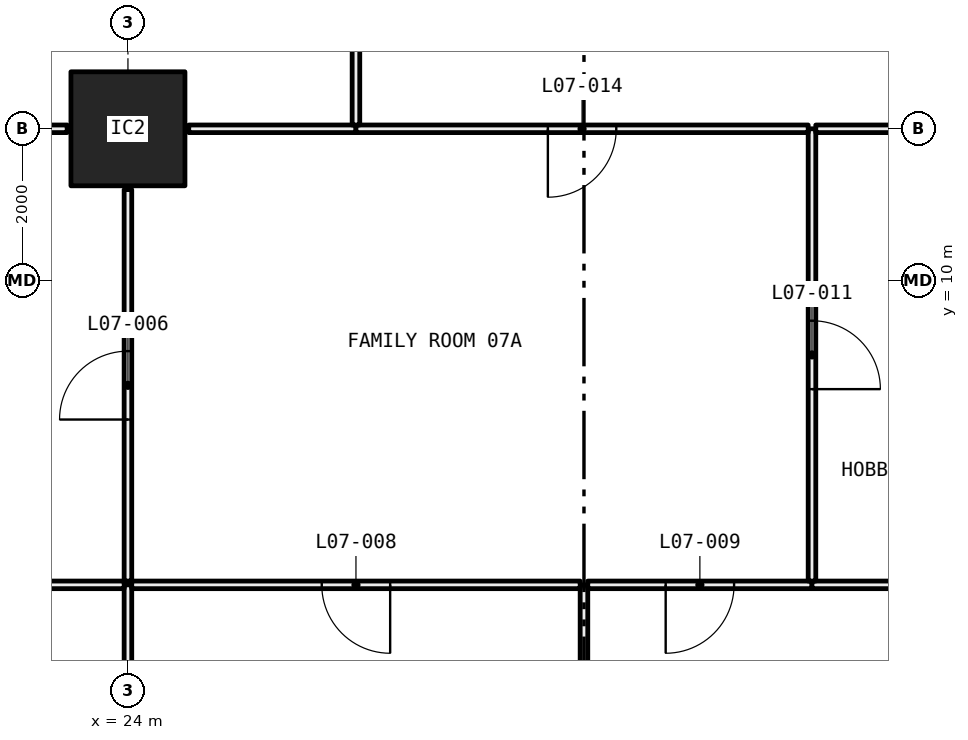
"""IFC4 building model, lengths in metres.
Left out: names, types, materials, properties, quantities, classifications, styles, units other than length and angle.
Written with IfcOpenShell. Run it as: python <this file> out.ifc"""

import sys

from ifc_helpers import new_model, si_unit, direction, frame, frame_2d, origin, origin_2d, place, context, subcontext, project, spatial, rectangle, hollow_rectangle, extrude, element, fill, save


model = new_model("IFC4")
c1 = context("Model", 3, precision=1e-05, world=origin(), true_north=direction((0.0, 1.0)))
c2 = subcontext(c1, "Body", "Model", "MODEL_VIEW")
j1 = project(units=[si_unit("LENGTHUNIT", "METRE"), si_unit("PLANEANGLEUNIT", "RADIAN")], contexts=[c1])
p1 = place(None, origin())
s1 = spatial("IfcSite", under=j1, at=p1, CompositionType="ELEMENT")
p2 = place(p1, origin())
s2 = spatial("IfcBuilding", under=s1, at=p2, CompositionType="ELEMENT")
p3 = place(p2, frame((0.0, 0.0, 36.9)))
s3 = spatial("IfcBuildingStorey", under=s2, at=p3, CompositionType="ELEMENT", Elevation=36.9)
p4 = place(p3, frame((24.0, 12.0, 0.0), z_axis=(0.0, 0.0, 1.0), x_axis=(1.0, 0.0, 0.0)))
e1 = element("IfcColumn", 1, at=p4, inside=s3, PredefinedType="COLUMN", context=c2, shape_type="SweptSolid", body=[
    extrude(hollow_rectangle(XDim=1.5, YDim=1.5, WallThickness=0.065, at=origin_2d()), origin(), (0.0, 0.0, 1.0), 3.05),
])
p5 = place(p3, frame((24.0, 0.72, 0.0), z_axis=(0.0, 0.0, 1.0), x_axis=(0.0, 1.0, 0.0)))
e2 = element("IfcWall", 2, at=p5, inside=s3, PredefinedType="PARTITIONING", context=c2, shape_type="SweptSolid", body=[
    extrude(rectangle(XDim=5.28, YDim=0.1, at=frame_2d((2.64, 0.0))), origin(), (0.0, 0.0, 1.0), 2.45),
])
p6 = place(p3, frame((23.95, 6.0, 0.0), z_axis=(0.0, 0.0, 1.0), x_axis=(-1.0, 0.0, 0.0)))
e3 = element("IfcWall", 3, at=p6, inside=s3, PredefinedType="PARTITIONING", context=c2, shape_type="SweptSolid", body=[
    extrude(rectangle(XDim=5.9, YDim=0.1, at=frame_2d((2.95, 0.0))), origin(), (0.0, 0.0, 1.0), 2.45),
])
p7 = place(p6, frame((2.5, 0.0, 0.0)))
e4 = element("IfcOpeningElement", 4, at=p7, cuts=e3, PredefinedType="OPENING", context=c2, shape_type="SweptSolid", body=[
    extrude(rectangle(XDim=0.9, YDim=2.1, at=frame_2d((0.45, 1.05))), frame((0.0, 0.06, 0.0), z_axis=(0.0, -1.0, 0.0), x_axis=(1.0, 0.0, 0.0)), (0.0, 0.0, 1.0), 0.12),
])
p8 = place(p3, frame((30.0, 0.72, 0.0), z_axis=(0.0, 0.0, 1.0), x_axis=(0.0, 1.0, 0.0)))
e5 = element("IfcWall", 5, at=p8, inside=s3, PredefinedType="PARTITIONING", context=c2, shape_type="SweptSolid", body=[
    extrude(rectangle(XDim=5.28, YDim=0.1, at=frame_2d((2.64, 0.0))), origin(), (0.0, 0.0, 1.0), 3.05),
])
p9 = place(p3, frame((29.95, 6.0, 0.0), z_axis=(0.0, 0.0, 1.0), x_axis=(-1.0, 0.0, 0.0)))
e6 = element("IfcWall", 6, at=p9, inside=s3, PredefinedType="PARTITIONING", context=c2, shape_type="SweptSolid", body=[
    extrude(rectangle(XDim=5.9, YDim=0.1, at=frame_2d((2.95, 0.0))), origin(), (0.0, 0.0, 1.0), 2.45),
])
p10 = place(p9, frame((2.5, 0.0, 0.0)))
e7 = element("IfcOpeningElement", 7, at=p10, cuts=e6, PredefinedType="OPENING", context=c2, shape_type="SweptSolid", body=[
    extrude(rectangle(XDim=0.9, YDim=2.1, at=frame_2d((0.45, 1.05))), frame((0.0, 0.06, 0.0), z_axis=(0.0, -1.0, 0.0), x_axis=(1.0, 0.0, 0.0)), (0.0, 0.0, 1.0), 0.12),
])
p11 = place(p3, frame((33.0, 6.0, 0.0), z_axis=(0.0, 0.0, 1.0), x_axis=(-1.0, 0.0, 0.0)))
e8 = element("IfcWall", 8, at=p11, inside=s3, PredefinedType="PARTITIONING", context=c2, shape_type="SweptSolid", body=[
    extrude(rectangle(XDim=2.95, YDim=0.1, at=frame_2d((1.475, 0.0))), origin(), (0.0, 0.0, 1.0), 3.05),
])
p12 = place(p11, frame((1.025, 0.0, 0.0)))
e9 = element("IfcOpeningElement", 9, at=p12, cuts=e8, PredefinedType="OPENING", context=c2, shape_type="SweptSolid", body=[
    extrude(rectangle(XDim=0.9, YDim=2.1, at=frame_2d((0.45, 1.05))), frame((0.0, 0.06, 0.0), z_axis=(0.0, -1.0, 0.0), x_axis=(1.0, 0.0, 0.0)), (0.0, 0.0, 1.0), 0.12),
])
p13 = place(p3, frame((35.9, 6.0, 0.0), z_axis=(0.0, 0.0, 1.0), x_axis=(-1.0, 0.0, 0.0)))
e10 = element("IfcWall", 10, at=p13, inside=s3, PredefinedType="PARTITIONING", context=c2, shape_type="SweptSolid", body=[
    extrude(rectangle(XDim=2.9, YDim=0.1, at=frame_2d((1.45, 0.0))), origin(), (0.0, 0.0, 1.0), 3.05),
])
p14 = place(p3, frame((24.0, 6.05, 0.0), z_axis=(0.0, 0.0, 1.0), x_axis=(0.0, 1.0, 0.0)))
e11 = element("IfcWall", 11, at=p14, inside=s3, PredefinedType="PARTITIONING", context=c2, shape_type="SweptSolid", body=[
    extrude(rectangle(XDim=5.15, YDim=0.1, at=frame_2d((2.575, 0.0))), origin(), (0.0, 0.0, 1.0), 2.45),
])
p15 = place(p14, frame((2.125, 0.0, 0.0)))
e12 = element("IfcOpeningElement", 12, at=p15, cuts=e11, PredefinedType="OPENING", context=c2, shape_type="SweptSolid", body=[
    extrude(rectangle(XDim=0.9, YDim=2.1, at=frame_2d((0.45, 1.05))), frame((0.0, 0.06, 0.0), z_axis=(0.0, -1.0, 0.0), x_axis=(1.0, 0.0, 0.0)), (0.0, 0.0, 1.0), 0.12),
])
p16 = place(p3, frame((23.2, 12.0, 0.0), z_axis=(0.0, 0.0, 1.0), x_axis=(-1.0, 0.0, 0.0)))
e13 = element("IfcWall", 13, at=p16, inside=s3, PredefinedType="PARTITIONING", context=c2, shape_type="SweptSolid", body=[
    extrude(rectangle(XDim=5.2, YDim=0.1, at=frame_2d((2.6, 0.0))), origin(), (0.0, 0.0, 1.0), 2.45),
])
p17 = place(p3, frame((33.0, 6.05, 0.0), z_axis=(0.0, 0.0, 1.0), x_axis=(0.0, 1.0, 0.0)))
e14 = element("IfcWall", 14, at=p17, inside=s3, PredefinedType="PARTITIONING", context=c2, shape_type="SweptSolid", body=[
    extrude(rectangle(XDim=5.95, YDim=0.1, at=frame_2d((2.975, 0.0))), origin(), (0.0, 0.0, 1.0), 2.45),
])
p18 = place(p17, frame((2.525, 0.0, 0.0)))
e15 = element("IfcOpeningElement", 15, at=p18, cuts=e14, PredefinedType="OPENING", context=c2, shape_type="SweptSolid", body=[
    extrude(rectangle(XDim=0.9, YDim=2.1, at=frame_2d((0.45, 1.05))), frame((0.0, 0.06, 0.0), z_axis=(0.0, -1.0, 0.0), x_axis=(1.0, 0.0, 0.0)), (0.0, 0.0, 1.0), 0.12),
])
p19 = place(p3, frame((27.0, 12.0, 0.0), z_axis=(0.0, 0.0, 1.0), x_axis=(-1.0, 0.0, 0.0)))
e16 = element("IfcWall", 16, at=p19, inside=s3, PredefinedType="PARTITIONING", context=c2, shape_type="SweptSolid", body=[
    extrude(rectangle(XDim=2.2, YDim=0.1, at=frame_2d((1.1, 0.0))), origin(), (0.0, 0.0, 1.0), 2.45),
])
p20 = place(p3, frame((32.95, 12.0, 0.0), z_axis=(0.0, 0.0, 1.0), x_axis=(-1.0, 0.0, 0.0)))
e17 = element("IfcWall", 17, at=p20, inside=s3, PredefinedType="PARTITIONING", context=c2, shape_type="SweptSolid", body=[
    extrude(rectangle(XDim=5.95, YDim=0.1, at=frame_2d((2.975, 0.0))), origin(), (0.0, 0.0, 1.0), 2.45),
])
p21 = place(p20, frame((2.525, 0.0, 0.0)))
e18 = element("IfcOpeningElement", 18, at=p21, cuts=e17, PredefinedType="OPENING", context=c2, shape_type="SweptSolid", body=[
    extrude(rectangle(XDim=0.9, YDim=2.1, at=frame_2d((0.45, 1.05))), frame((0.0, 0.06, 0.0), z_axis=(0.0, -1.0, 0.0), x_axis=(1.0, 0.0, 0.0)), (0.0, 0.0, 1.0), 0.12),
])
p22 = place(p3, frame((35.2, 12.0, 0.0), z_axis=(0.0, 0.0, 1.0), x_axis=(-1.0, 0.0, 0.0)))
e19 = element("IfcWall", 19, at=p22, inside=s3, PredefinedType="PARTITIONING", context=c2, shape_type="SweptSolid", body=[
    extrude(rectangle(XDim=2.15, YDim=0.1, at=frame_2d((1.075, 0.0))), origin(), (0.0, 0.0, 1.0), 2.45),
])
p23 = place(p3, frame((27.0, 12.05, 0.0), z_axis=(0.0, 0.0, 1.0), x_axis=(0.0, 1.0, 0.0)))
e20 = element("IfcWall", 20, at=p23, inside=s3, PredefinedType="PARTITIONING", context=c2, shape_type="SweptSolid", body=[
    extrude(rectangle(XDim=5.95, YDim=0.1, at=frame_2d((2.975, 0.0))), origin(), (0.0, 0.0, 1.0), 2.45),
])
p24 = place(p15, origin())
e21 = element("IfcDoor", 21, at=p24, inside=s3, OperationType="SINGLE_SWING_RIGHT", PredefinedType="DOOR", context=c2, shape_type="SweptSolid", body=[
    extrude(rectangle(XDim=0.9, YDim=2.1, at=frame_2d((0.45, 1.05))), frame((0.0, 0.025, 0.0), z_axis=(0.0, -1.0, 0.0), x_axis=(1.0, 0.0, 0.0)), (0.0, 0.0, 1.0), 0.05),
])
fill(e12, e21)
p25 = place(p10, origin())
e22 = element("IfcDoor", 22, at=p25, inside=s3, OperationType="SINGLE_SWING_RIGHT", PredefinedType="DOOR", context=c2, shape_type="SweptSolid", body=[
    extrude(rectangle(XDim=0.9, YDim=2.1, at=frame_2d((0.45, 1.05))), frame((0.0, 0.025, 0.0), z_axis=(0.0, -1.0, 0.0), x_axis=(1.0, 0.0, 0.0)), (0.0, 0.0, 1.0), 0.05),
])
fill(e7, e22)
p26 = place(p12, origin())
e23 = element("IfcDoor", 23, at=p26, inside=s3, OperationType="SINGLE_SWING_LEFT", PredefinedType="DOOR", context=c2, shape_type="SweptSolid", body=[
    extrude(rectangle(XDim=0.9, YDim=2.1, at=frame_2d((0.45, 1.05))), frame((0.0, 0.025, 0.0), z_axis=(0.0, -1.0, 0.0), x_axis=(1.0, 0.0, 0.0)), (0.0, 0.0, 1.0), 0.05),
])
fill(e9, e23)
p27 = place(p18, frame((0.9, 0.0, 0.0), x_axis=(-1.0, 0.0, 0.0)))
e24 = element("IfcDoor", 24, at=p27, inside=s3, OperationType="SINGLE_SWING_LEFT", PredefinedType="DOOR", context=c2, shape_type="SweptSolid", body=[
    extrude(rectangle(XDim=0.9, YDim=2.1, at=frame_2d((0.45, 1.05))), frame((0.0, 0.025, 0.0), z_axis=(0.0, -1.0, 0.0), x_axis=(1.0, 0.0, 0.0)), (0.0, 0.0, 1.0), 0.05),
])
fill(e15, e24)
p28 = place(p21, origin())
e25 = element("IfcDoor", 25, at=p28, inside=s3, OperationType="SINGLE_SWING_LEFT", PredefinedType="DOOR", context=c2, shape_type="SweptSolid", body=[
    extrude(rectangle(XDim=0.9, YDim=2.1, at=frame_2d((0.45, 1.05))), frame((0.0, 0.025, 0.0), z_axis=(0.0, -1.0, 0.0), x_axis=(1.0, 0.0, 0.0)), (0.0, 0.0, 1.0), 0.05),
])
fill(e18, e25)
save(model, sys.argv[1])
